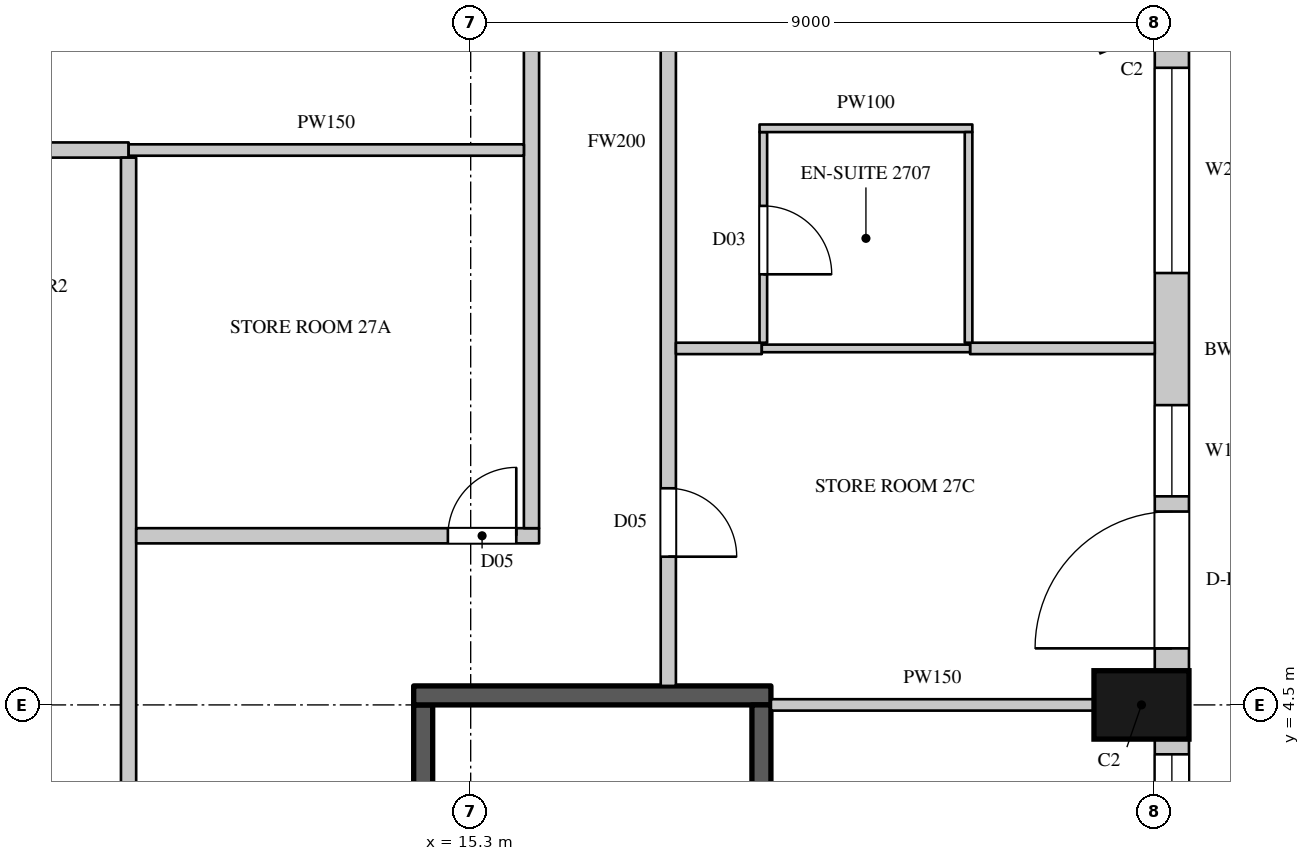
"""IFC4 building model, lengths in metres.
Left out: names, types, materials, properties, quantities, classifications, styles, units other than length and angle.
Written with IfcOpenShell. Run it as: python <this file> out.ifc"""

import sys

from ifc_helpers import new_model, si_unit, direction, frame, frame_2d, origin, origin_2d, place, context, subcontext, project, spatial, rectangle, extrude, element, fill, save


model = new_model("IFC4")
c1 = context("Model", 3, precision=1e-05, world=origin(), true_north=direction((0.0, 1.0)))
c2 = subcontext(c1, "Body", "Model", "MODEL_VIEW")
j1 = project(units=[si_unit("LENGTHUNIT", "METRE"), si_unit("PLANEANGLEUNIT", "RADIAN")], contexts=[c1])
p1 = place(None, origin())
s1 = spatial("IfcSite", under=j1, at=p1, CompositionType="ELEMENT")
p2 = place(p1, origin())
s2 = spatial("IfcBuilding", under=s1, at=p2, CompositionType="ELEMENT")
p3 = place(p2, frame((0.0, 0.0, 127.5)))
s3 = spatial("IfcBuildingStorey", under=s2, at=p3, CompositionType="ELEMENT", Elevation=127.5)
p4 = place(p3, frame((24.125, 4.5, 0.0), z_axis=(0.0, 0.0, 1.0), x_axis=(0.0, 1.0, 0.0)))
e1 = element("IfcColumn", 1, at=p4, inside=s3, PredefinedType="COLUMN", context=c2, shape_type="SweptSolid", body=[
    extrude(rectangle(XDim=0.9, YDim=1.25, at=origin_2d()), origin(), (0.0, 0.0, 1.0), 3.6),
])
p5 = place(p3, frame((24.525, -4.05, 0.0), z_axis=(0.0, 0.0, 1.0), x_axis=(0.0, 1.0, 0.0)))
e2 = element("IfcWall", 2, at=p5, inside=s3, PredefinedType="SOLIDWALL", context=c2, shape_type="SweptSolid", body=[
    extrude(rectangle(XDim=8.1, YDim=0.45, at=frame_2d((4.05, 0.0))), origin(), (0.0, 0.0, 1.0), 3.3),
])
p6 = place(p5, frame((0.2, 0.0, 0.0)))
e3 = element("IfcOpeningElement", 3, at=p6, cuts=e2, PredefinedType="OPENING", context=c2, shape_type="SweptSolid", body=[
    extrude(rectangle(XDim=1.8, YDim=2.4, at=frame_2d((0.9, 1.2))), frame((0.0, 0.235, 0.0), z_axis=(0.0, -1.0, 0.0), x_axis=(1.0, 0.0, 0.0)), (0.0, 0.0, 1.0), 0.47),
])
p7 = place(p5, frame((2.2, 0.0, 1.05)))
e4 = element("IfcOpeningElement", 4, at=p7, cuts=e2, PredefinedType="OPENING", context=c2, shape_type="SweptSolid", body=[
    extrude(rectangle(XDim=1.2, YDim=2.0, at=frame_2d((0.6, 1.0))), frame((0.0, 0.235, 0.0), z_axis=(0.0, -1.0, 0.0), x_axis=(1.0, 0.0, 0.0)), (0.0, 0.0, 1.0), 0.47),
])
p8 = place(p5, frame((4.7, 0.0, 0.0)))
e5 = element("IfcOpeningElement", 5, at=p8, cuts=e2, PredefinedType="OPENING", context=c2, shape_type="SweptSolid", body=[
    extrude(rectangle(XDim=1.8, YDim=2.4, at=frame_2d((0.9, 1.2))), frame((0.0, 0.235, 0.0), z_axis=(0.0, -1.0, 0.0), x_axis=(1.0, 0.0, 0.0)), (0.0, 0.0, 1.0), 0.47),
])
p9 = place(p5, frame((6.7, 0.0, 1.05)))
e6 = element("IfcOpeningElement", 6, at=p9, cuts=e2, PredefinedType="OPENING", context=c2, shape_type="SweptSolid", body=[
    extrude(rectangle(XDim=1.2, YDim=2.0, at=frame_2d((0.6, 1.0))), frame((0.0, 0.235, 0.0), z_axis=(0.0, -1.0, 0.0), x_axis=(1.0, 0.0, 0.0)), (0.0, 0.0, 1.0), 0.47),
])
p10 = place(p3, frame((24.525, 4.95, 0.0), z_axis=(0.0, 0.0, 1.0), x_axis=(0.0, 1.0, 0.0)))
e7 = element("IfcWall", 7, at=p10, inside=s3, PredefinedType="SOLIDWALL", context=c2, shape_type="SweptSolid", body=[
    extrude(rectangle(XDim=8.439, YDim=0.45, at=frame_2d((4.219, 0.0))), origin(), (0.0, 0.0, 1.0), 3.3),
])
p11 = place(p10, frame((0.294, 0.0, 0.0)))
e8 = element("IfcOpeningElement", 8, at=p11, cuts=e7, PredefinedType="OPENING", context=c2, shape_type="SweptSolid", body=[
    extrude(rectangle(XDim=1.8, YDim=2.4, at=frame_2d((0.9, 1.2))), frame((0.0, 0.235, 0.0), z_axis=(0.0, -1.0, 0.0), x_axis=(1.0, 0.0, 0.0)), (0.0, 0.0, 1.0), 0.47),
])
p12 = place(p10, frame((2.294, 0.0, 1.05)))
e9 = element("IfcOpeningElement", 9, at=p12, cuts=e7, PredefinedType="OPENING", context=c2, shape_type="SweptSolid", body=[
    extrude(rectangle(XDim=1.2, YDim=2.0, at=frame_2d((0.6, 1.0))), frame((0.0, 0.235, 0.0), z_axis=(0.0, -1.0, 0.0), x_axis=(1.0, 0.0, 0.0)), (0.0, 0.0, 1.0), 0.47),
])
p13 = place(p10, frame((5.232, 0.0, 1.05)))
e10 = element("IfcOpeningElement", 10, at=p13, cuts=e7, PredefinedType="OPENING", context=c2, shape_type="SweptSolid", body=[
    extrude(rectangle(XDim=2.7, YDim=2.0, at=frame_2d((1.35, 1.0))), frame((0.0, 0.235, 0.0), z_axis=(0.0, -1.0, 0.0), x_axis=(1.0, 0.0, 0.0)), (0.0, 0.0, 1.0), 0.47),
])
p14 = place(p3, frame((-8.9, 11.8, 0.0), z_axis=(0.0, 0.0, 1.0), x_axis=(1.0, 0.0, 0.0)))
e11 = element("IfcWall", 11, at=p14, inside=s3, PredefinedType="PARTITIONING", context=c2, shape_type="SweptSolid", body=[
    extrude(rectangle(XDim=19.7, YDim=0.2, at=frame_2d((9.85, 0.0))), origin(), (0.0, 0.0, 1.0), 3.3),
])
p15 = place(p14, frame((0.8, 0.0, 0.0)))
e12 = element("IfcOpeningElement", 12, at=p15, cuts=e11, PredefinedType="OPENING", context=c2, shape_type="SweptSolid", body=[
    extrude(rectangle(XDim=1.5, YDim=2.2, at=frame_2d((0.75, 1.1))), frame((0.0, 0.11, 0.0), z_axis=(0.0, -1.0, 0.0), x_axis=(1.0, 0.0, 0.0)), (0.0, 0.0, 1.0), 0.22),
])
p16 = place(p3, frame((10.799, -12.5, 0.0), z_axis=(0.0, 0.0, 1.0), x_axis=(0.0, 1.0, 0.0)))
e13 = element("IfcWall", 13, at=p16, inside=s3, PredefinedType="PARTITIONING", context=c2, shape_type="SweptSolid", body=[
    extrude(rectangle(XDim=24.2, YDim=0.2, at=frame_2d((12.1, 0.0))), origin(), (0.0, 0.0, 1.0), 3.3),
])
p17 = place(p16, frame((13.15, 0.0, 0.0)))
e14 = element("IfcOpeningElement", 14, at=p17, cuts=e13, PredefinedType="OPENING", context=c2, shape_type="SweptSolid", body=[
    extrude(rectangle(XDim=1.5, YDim=2.2, at=frame_2d((0.75, 1.1))), frame((0.0, 0.11, 0.0), z_axis=(0.0, -1.0, 0.0), x_axis=(1.0, 0.0, 0.0)), (0.0, 0.0, 1.0), 0.22),
])
p18 = place(p3, frame((10.9, 6.725, 0.0), z_axis=(0.0, 0.0, 1.0), x_axis=(1.0, 0.0, 0.0)))
e15 = element("IfcWall", 15, at=p18, inside=s3, PredefinedType="PARTITIONING", context=c2, shape_type="SweptSolid", body=[
    extrude(rectangle(XDim=5.3, YDim=0.2, at=frame_2d((2.65, 0.0))), origin(), (0.0, 0.0, 1.0), 3.3),
])
p19 = place(p18, frame((4.1, 0.0, 0.0)))
e16 = element("IfcOpeningElement", 16, at=p19, cuts=e15, PredefinedType="OPENING", context=c2, shape_type="SweptSolid", body=[
    extrude(rectangle(XDim=0.9, YDim=2.2, at=frame_2d((0.45, 1.1))), frame((0.0, 0.11, 0.0), z_axis=(0.0, -1.0, 0.0), x_axis=(1.0, 0.0, 0.0)), (0.0, 0.0, 1.0), 0.22),
])
p20 = place(p3, frame((16.1, 6.825, 0.0), z_axis=(0.0, 0.0, 1.0), x_axis=(0.0, 1.0, 0.0)))
e17 = element("IfcWall", 17, at=p20, inside=s3, PredefinedType="PARTITIONING", context=c2, shape_type="SweptSolid", body=[
    extrude(rectangle(XDim=10.575, YDim=0.2, at=frame_2d((5.288, 0.0))), origin(), (0.0, 0.0, 1.0), 3.3),
])
p21 = place(p3, frame((17.9, 4.75, 0.0), z_axis=(0.0, 0.0, 1.0), x_axis=(0.0, 1.0, 0.0)))
e18 = element("IfcWall", 18, at=p21, inside=s3, PredefinedType="PARTITIONING", context=c2, shape_type="SweptSolid", body=[
    extrude(rectangle(XDim=14.314, YDim=0.2, at=frame_2d((7.157, 0.0))), origin(), (0.0, 0.0, 1.0), 3.3),
])
p22 = place(p21, frame((1.7, 0.0, 0.0)))
e19 = element("IfcOpeningElement", 19, at=p22, cuts=e18, PredefinedType="OPENING", context=c2, shape_type="SweptSolid", body=[
    extrude(rectangle(XDim=0.9, YDim=2.2, at=frame_2d((0.45, 1.1))), frame((0.0, 0.11, 0.0), z_axis=(0.0, -1.0, 0.0), x_axis=(1.0, 0.0, 0.0)), (0.0, 0.0, 1.0), 0.22),
])
p23 = place(p21, frame((10.2, 0.0, 0.0)))
e20 = element("IfcOpeningElement", 20, at=p23, cuts=e18, PredefinedType="OPENING", context=c2, shape_type="SweptSolid", body=[
    extrude(rectangle(XDim=0.95, YDim=2.2, at=frame_2d((0.475, 1.1))), frame((0.0, 0.11, 0.0), z_axis=(0.0, -1.0, 0.0), x_axis=(1.0, 0.0, 0.0)), (0.0, 0.0, 1.0), 0.22),
])
p24 = place(p3, frame((10.8, 11.8, 0.0), z_axis=(0.0, 0.0, 1.0), x_axis=(1.0, 0.0, 0.0)))
e21 = element("IfcWall", 21, at=p24, inside=s3, PredefinedType="PARTITIONING", context=c2, shape_type="SweptSolid", body=[
    extrude(rectangle(XDim=5.2, YDim=0.15, at=frame_2d((2.6, 0.0))), origin(), (0.0, 0.0, 1.0), 3.3),
])
p25 = place(p3, frame((18.0, 9.19, 0.0), z_axis=(0.0, 0.0, 1.0), x_axis=(1.0, 0.0, 0.0)))
e22 = element("IfcWall", 22, at=p25, inside=s3, PredefinedType="PARTITIONING", context=c2, shape_type="SweptSolid", body=[
    extrude(rectangle(XDim=1.13, YDim=0.15, at=frame_2d((0.565, 0.0))), origin(), (0.0, 0.0, 1.0), 2.65),
])
p26 = place(p3, frame((19.25, 4.5, 0.0), z_axis=(0.0, 0.0, 1.0), x_axis=(1.0, 0.0, 0.0)))
e23 = element("IfcWall", 23, at=p26, inside=s3, PredefinedType="PARTITIONING", context=c2, shape_type="SweptSolid", body=[
    extrude(rectangle(XDim=4.25, YDim=0.15, at=frame_2d((2.125, 0.0))), origin(), (0.0, 0.0, 1.0), 3.3),
])
p27 = place(p3, frame((21.87, 9.19, 0.0), z_axis=(0.0, 0.0, 1.0), x_axis=(1.0, 0.0, 0.0)))
e24 = element("IfcWall", 24, at=p27, inside=s3, PredefinedType="PARTITIONING", context=c2, shape_type="SweptSolid", body=[
    extrude(rectangle(XDim=2.43, YDim=0.15, at=frame_2d((1.215, 0.0))), origin(), (0.0, 0.0, 1.0), 2.65),
])
p28 = place(p3, frame((14.675, -4.5, 0.0), z_axis=(0.0, 0.0, 1.0), x_axis=(0.0, 1.0, 0.0)))
e25 = element("IfcWall", 25, at=p28, inside=s3, PredefinedType="SHEAR", context=c2, shape_type="SweptSolid", body=[
    extrude(rectangle(XDim=9.0, YDim=0.25, at=frame_2d((4.5, 0.0))), origin(), (0.0, 0.0, 1.0), 3.3),
])
p29 = place(p28, frame((0.45, 0.0, 0.0)))
e26 = element("IfcOpeningElement", 26, at=p29, cuts=e25, PredefinedType="OPENING", context=c2, shape_type="SweptSolid", body=[
    extrude(rectangle(XDim=1.1, YDim=2.2, at=frame_2d((0.55, 1.1))), frame((0.0, 0.135, 0.0), z_axis=(0.0, -1.0, 0.0), x_axis=(1.0, 0.0, 0.0)), (0.0, 0.0, 1.0), 0.27),
])
p30 = place(p3, frame((14.55, 4.625, 0.0), z_axis=(0.0, 0.0, 1.0), x_axis=(1.0, 0.0, 0.0)))
e27 = element("IfcWall", 27, at=p30, inside=s3, PredefinedType="SHEAR", context=c2, shape_type="SweptSolid", body=[
    extrude(rectangle(XDim=4.7, YDim=0.25, at=frame_2d((2.35, 0.0))), origin(), (0.0, 0.0, 1.0), 3.3),
])
p31 = place(p3, frame((19.125, -4.5, 0.0), z_axis=(0.0, 0.0, 1.0), x_axis=(0.0, 1.0, 0.0)))
e28 = element("IfcWall", 28, at=p31, inside=s3, PredefinedType="SHEAR", context=c2, shape_type="SweptSolid", body=[
    extrude(rectangle(XDim=9.0, YDim=0.25, at=frame_2d((4.5, 0.0))), origin(), (0.0, 0.0, 1.0), 3.3),
])
p32 = place(p3, frame((19.13, 9.19, 0.0), z_axis=(0.0, 0.0, 1.0), x_axis=(1.0, 0.0, 0.0)))
e29 = element("IfcWall", 29, at=p32, inside=s3, PredefinedType="PARTITIONING", context=c2, shape_type="SweptSolid", body=[
    extrude(rectangle(XDim=2.74, YDim=0.1, at=frame_2d((1.37, 0.0))), origin(), (0.0, 0.0, 1.0), 2.65),
])
p33 = place(p3, frame((19.15, 9.265, 0.0), z_axis=(0.0, 0.0, 1.0), x_axis=(0.0, 1.0, 0.0)))
e30 = element("IfcWall", 30, at=p33, inside=s3, PredefinedType="PARTITIONING", context=c2, shape_type="SweptSolid", body=[
    extrude(rectangle(XDim=2.771, YDim=0.1, at=frame_2d((1.385, 0.0))), origin(), (0.0, 0.0, 1.0), 3.3),
])
p34 = place(p33, frame((0.9, 0.0, 0.0)))
e31 = element("IfcOpeningElement", 31, at=p34, cuts=e30, PredefinedType="OPENING", context=c2, shape_type="SweptSolid", body=[
    extrude(rectangle(XDim=0.9, YDim=2.2, at=frame_2d((0.45, 1.1))), frame((0.0, 0.06, 0.0), z_axis=(0.0, -1.0, 0.0), x_axis=(1.0, 0.0, 0.0)), (0.0, 0.0, 1.0), 0.12),
])
p35 = place(p3, frame((19.1, 12.086, 0.0), z_axis=(0.0, 0.0, 1.0), x_axis=(1.0, 0.0, 0.0)))
e32 = element("IfcWall", 32, at=p35, inside=s3, PredefinedType="PARTITIONING", context=c2, shape_type="SweptSolid", body=[
    extrude(rectangle(XDim=2.8, YDim=0.1, at=frame_2d((1.4, 0.0))), origin(), (0.0, 0.0, 1.0), 3.3),
])
p36 = place(p3, frame((21.85, 9.265, 0.0), z_axis=(0.0, 0.0, 1.0), x_axis=(0.0, 1.0, 0.0)))
e33 = element("IfcWall", 33, at=p36, inside=s3, PredefinedType="PARTITIONING", context=c2, shape_type="SweptSolid", body=[
    extrude(rectangle(XDim=2.771, YDim=0.1, at=frame_2d((1.385, 0.0))), origin(), (0.0, 0.0, 1.0), 3.3),
])
p37 = place(p9, origin())
e34 = element("IfcWindow", 34, at=p37, inside=s3, PartitioningType="SINGLE_PANEL", PredefinedType="WINDOW", context=c2, shape_type="SweptSolid", body=[
    extrude(rectangle(XDim=1.2, YDim=2.0, at=frame_2d((0.6, 1.0))), frame((0.0, 0.135, 0.0), z_axis=(0.0, -1.0, 0.0), x_axis=(1.0, 0.0, 0.0)), (0.0, 0.0, 1.0), 0.06),
])
fill(e6, e34)
p38 = place(p11, origin())
e35 = element("IfcDoor", 35, at=p38, inside=s3, OperationType="SLIDING_TO_LEFT", PredefinedType="DOOR", context=c2, shape_type="SweptSolid", body=[
    extrude(rectangle(XDim=1.8, YDim=2.4, at=frame_2d((0.9, 1.2))), frame((0.0, 0.13, 0.0), z_axis=(0.0, -1.0, 0.0), x_axis=(1.0, 0.0, 0.0)), (0.0, 0.0, 1.0), 0.05),
])
fill(e8, e35)
p39 = place(p12, origin())
e36 = element("IfcWindow", 36, at=p39, inside=s3, PartitioningType="SINGLE_PANEL", PredefinedType="WINDOW", context=c2, shape_type="SweptSolid", body=[
    extrude(rectangle(XDim=1.2, YDim=2.0, at=frame_2d((0.6, 1.0))), frame((0.0, 0.135, 0.0), z_axis=(0.0, -1.0, 0.0), x_axis=(1.0, 0.0, 0.0)), (0.0, 0.0, 1.0), 0.06),
])
fill(e9, e36)
p40 = place(p13, origin())
e37 = element("IfcWindow", 37, at=p40, inside=s3, PartitioningType="SINGLE_PANEL", PredefinedType="WINDOW", context=c2, shape_type="SweptSolid", body=[
    extrude(rectangle(XDim=2.7, YDim=2.0, at=frame_2d((1.35, 1.0))), frame((0.0, 0.135, 0.0), z_axis=(0.0, -1.0, 0.0), x_axis=(1.0, 0.0, 0.0)), (0.0, 0.0, 1.0), 0.06),
])
fill(e10, e37)
p41 = place(p19, origin())
e38 = element("IfcDoor", 38, at=p41, inside=s3, OperationType="SINGLE_SWING_RIGHT", PredefinedType="DOOR", context=c2, shape_type="SweptSolid", body=[
    extrude(rectangle(XDim=0.9, YDim=2.2, at=frame_2d((0.45, 1.1))), frame((0.0, 0.025, 0.0), z_axis=(0.0, -1.0, 0.0), x_axis=(1.0, 0.0, 0.0)), (0.0, 0.0, 1.0), 0.05),
])
fill(e16, e38)
p42 = place(p22, origin())
e39 = element("IfcDoor", 39, at=p42, inside=s3, OperationType="SINGLE_SWING_RIGHT", PredefinedType="DOOR", context=c2, shape_type="SweptSolid", body=[
    extrude(rectangle(XDim=0.9, YDim=2.2, at=frame_2d((0.45, 1.1))), frame((0.0, 0.025, 0.0), z_axis=(0.0, -1.0, 0.0), x_axis=(1.0, 0.0, 0.0)), (0.0, 0.0, 1.0), 0.05),
])
fill(e19, e39)
p43 = place(p34, origin())
e40 = element("IfcDoor", 40, at=p43, inside=s3, OperationType="SINGLE_SWING_RIGHT", PredefinedType="DOOR", context=c2, shape_type="SweptSolid", body=[
    extrude(rectangle(XDim=0.9, YDim=2.2, at=frame_2d((0.45, 1.1))), frame((0.0, 0.025, 0.0), z_axis=(0.0, -1.0, 0.0), x_axis=(1.0, 0.0, 0.0)), (0.0, 0.0, 1.0), 0.05),
])
fill(e31, e40)
save(model, sys.argv[1])
